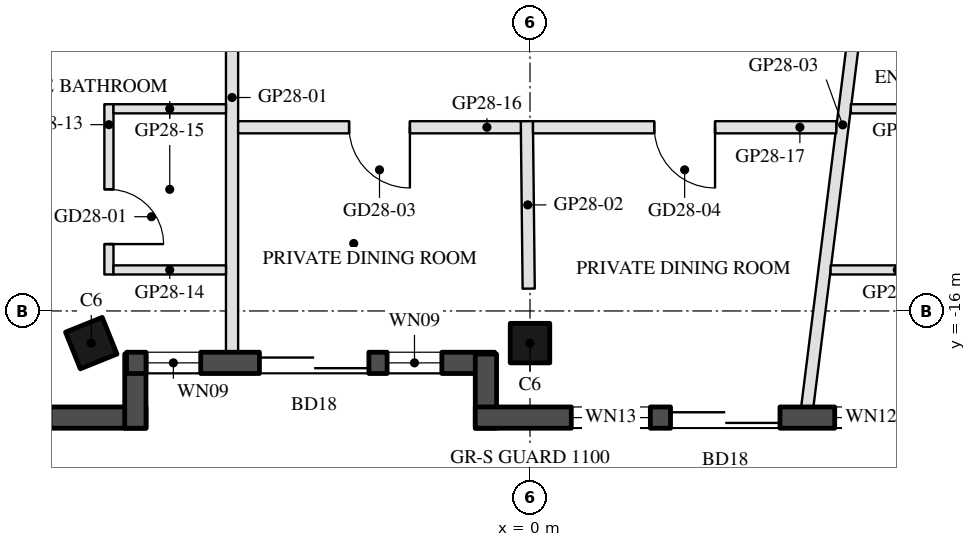
"""IFC4 building model, lengths in metres.
Left out: names, types, materials, properties, quantities, classifications, styles, units other than length and angle.
Written with IfcOpenShell. Run it as: python <this file> out.ifc"""

import sys

from ifc_helpers import new_model, si_unit, direction, frame, frame_2d, origin, origin_2d, place, context, subcontext, project, spatial, rectangle, hollow_rectangle, extrude, boolean, halfspace, element, fill, save


model = new_model("IFC4")
c1 = context("Model", 3, precision=1e-05, world=origin(), true_north=direction((0.0, 1.0)))
c2 = subcontext(c1, "Body", "Model", "MODEL_VIEW")
j1 = project(units=[si_unit("LENGTHUNIT", "METRE"), si_unit("PLANEANGLEUNIT", "RADIAN")], contexts=[c1])
p1 = place(None, origin())
s1 = spatial("IfcSite", under=j1, at=p1, CompositionType="ELEMENT")
p2 = place(p1, origin())
s2 = spatial("IfcBuilding", under=s1, at=p2, CompositionType="ELEMENT")
p3 = place(p2, frame((0.0, 0.0, 287.4)))
s3 = spatial("IfcBuildingStorey", under=s2, at=p3, CompositionType="ELEMENT", Elevation=287.4)
p4 = place(p3, frame((-7.215, -16.529, 0.0), z_axis=(0.060866554019, 0.151222465225, 0.986624056373), x_axis=(-0.998135530126, 0.004712991743, 0.06085434421)))
e1 = element("IfcColumn", 1, at=p4, inside=s3, PredefinedType="COLUMN", context=c2, shape_type="SweptSolid", body=[
    boolean("DIFFERENCE", boolean("DIFFERENCE", extrude(hollow_rectangle(XDim=0.65, YDim=0.65, WallThickness=0.03, at=origin_2d()), origin(), (0.0, 0.0, 1.0), 3.75), halfspace(frame((0.0, 0.0, 0.04), z_axis=(0.0, 0.0, 1.0), x_axis=(1.0, 0.0, 0.0)), True)), halfspace(frame((0.0, 0.0, 3.711), z_axis=(0.0, 0.0, 1.0), x_axis=(1.0, 0.0, 0.0)), False)),
])
p5 = place(p3, frame((0.0, -16.529, 0.0), z_axis=(0.0, 0.151503365725, 0.988456741681), x_axis=(-1.0, 0.0, 0.0)))
e2 = element("IfcColumn", 2, at=p5, inside=s3, PredefinedType="COLUMN", context=c2, shape_type="SweptSolid", body=[
    boolean("DIFFERENCE", boolean("DIFFERENCE", extrude(hollow_rectangle(XDim=0.65, YDim=0.65, WallThickness=0.03, at=origin_2d()), origin(), (0.0, 0.0, 1.0), 3.743), halfspace(frame((0.0, 0.0, 0.037), z_axis=(0.0, 0.0, 1.0), x_axis=(1.0, 0.0, 0.0)), True)), halfspace(frame((0.0, 0.0, 3.706), z_axis=(0.0, 0.0, 1.0), x_axis=(1.0, 0.0, 0.0)), False)),
])
p6 = place(p3, frame((-17.185, -17.754, 0.0), z_axis=(0.0, 0.0, 1.0), x_axis=(1.0, 0.0, 0.0)))
e3 = element("IfcWall", 3, at=p6, inside=s3, PredefinedType="SOLIDWALL", context=c2, shape_type="SweptSolid", body=[
    extrude(rectangle(XDim=10.87, YDim=0.35, at=frame_2d((5.435, 0.0))), origin(), (0.0, 0.0, 1.0), 3.55),
])
p7 = place(p6, frame((0.381, 0.0, 0.3)))
e4 = element("IfcOpeningElement", 4, at=p7, cuts=e3, PredefinedType="OPENING", context=c2, shape_type="SweptSolid", body=[
    extrude(rectangle(XDim=1.6, YDim=2.65, at=frame_2d((0.8, 1.325))), frame((0.0, 0.185, 0.0), z_axis=(0.0, -1.0, 0.0), x_axis=(1.0, 0.0, 0.0)), (0.0, 0.0, 1.0), 0.37),
])
p8 = place(p6, frame((6.89, 0.0, 0.0)))
e5 = element("IfcOpeningElement", 5, at=p8, cuts=e3, PredefinedType="OPENING", context=c2, shape_type="SweptSolid", body=[
    extrude(rectangle(XDim=2.4, YDim=2.4, at=frame_2d((1.2, 1.2))), frame((0.0, 0.185, 0.0), z_axis=(0.0, -1.0, 0.0), x_axis=(1.0, 0.0, 0.0)), (0.0, 0.0, 1.0), 0.37),
])
p9 = place(p6, frame((3.893, 0.0, 0.3)))
e6 = element("IfcOpeningElement", 6, at=p9, cuts=e3, PredefinedType="OPENING", context=c2, shape_type="SweptSolid", body=[
    extrude(rectangle(XDim=2.6, YDim=2.65, at=frame_2d((1.3, 1.325))), frame((0.0, 0.185, 0.0), z_axis=(0.0, -1.0, 0.0), x_axis=(1.0, 0.0, 0.0)), (0.0, 0.0, 1.0), 0.37),
])
p10 = place(p3, frame((-6.49, -17.929, 0.0), z_axis=(0.0, 0.0, 1.0), x_axis=(0.0, 1.0, 0.0)))
e7 = element("IfcWall", 7, at=p10, inside=s3, PredefinedType="SOLIDWALL", context=c2, shape_type="SweptSolid", body=[
    extrude(rectangle(XDim=1.22, YDim=0.35, at=frame_2d((0.61, 0.0))), origin(), (0.0, 0.0, 1.0), 3.55),
])
p11 = place(p3, frame((-6.635, -16.854, 0.0), z_axis=(0.0, 0.0, 1.0), x_axis=(1.0, 0.0, 0.0)))
e8 = element("IfcWall", 8, at=p11, inside=s3, PredefinedType="SOLIDWALL", context=c2, shape_type="SweptSolid", body=[
    extrude(rectangle(XDim=6.055, YDim=0.35, at=frame_2d((3.028, 0.0))), origin(), (0.0, 0.0, 1.0), 3.55),
])
p12 = place(p11, frame((0.32, 0.0, 0.3)))
e9 = element("IfcOpeningElement", 9, at=p12, cuts=e8, PredefinedType="OPENING", context=c2, shape_type="SweptSolid", body=[
    extrude(rectangle(XDim=0.9, YDim=2.65, at=frame_2d((0.45, 1.325))), frame((0.0, 0.185, 0.0), z_axis=(0.0, -1.0, 0.0), x_axis=(1.0, 0.0, 0.0)), (0.0, 0.0, 1.0), 0.37),
])
p13 = place(p11, frame((2.186, 0.0, 0.0)))
e10 = element("IfcOpeningElement", 10, at=p13, cuts=e8, PredefinedType="OPENING", context=c2, shape_type="SweptSolid", body=[
    extrude(rectangle(XDim=1.8, YDim=2.4, at=frame_2d((0.9, 1.2))), frame((0.0, 0.185, 0.0), z_axis=(0.0, -1.0, 0.0), x_axis=(1.0, 0.0, 0.0)), (0.0, 0.0, 1.0), 0.37),
])
p14 = place(p11, frame((4.285, 0.0, 0.3)))
e11 = element("IfcOpeningElement", 11, at=p14, cuts=e8, PredefinedType="OPENING", context=c2, shape_type="SweptSolid", body=[
    extrude(rectangle(XDim=0.9, YDim=2.65, at=frame_2d((0.45, 1.325))), frame((0.0, 0.185, 0.0), z_axis=(0.0, -1.0, 0.0), x_axis=(1.0, 0.0, 0.0)), (0.0, 0.0, 1.0), 0.37),
])
p15 = place(p3, frame((-0.725, -16.709, 0.0), z_axis=(0.0, 0.0, 1.0), x_axis=(0.0, -1.0, 0.0)))
e12 = element("IfcWall", 12, at=p15, inside=s3, PredefinedType="SOLIDWALL", context=c2, shape_type="SweptSolid", body=[
    extrude(rectangle(XDim=1.22, YDim=0.35, at=frame_2d((0.61, 0.0))), origin(), (0.0, 0.0, 1.0), 3.55),
])
p16 = place(p3, frame((-0.9, -17.754, 0.0), z_axis=(0.0, 0.0, 1.0), x_axis=(1.0, 0.0, 0.0)))
e13 = element("IfcWall", 13, at=p16, inside=s3, PredefinedType="SOLIDWALL", context=c2, shape_type="SweptSolid", body=[
    extrude(rectangle(XDim=9.015, YDim=0.35, at=frame_2d((4.508, 0.0))), origin(), (0.0, 0.0, 1.0), 3.55),
])
p17 = place(p16, frame((3.211, 0.0, 0.0)))
e14 = element("IfcOpeningElement", 14, at=p17, cuts=e13, PredefinedType="OPENING", context=c2, shape_type="SweptSolid", body=[
    extrude(rectangle(XDim=1.8, YDim=2.4, at=frame_2d((0.9, 1.2))), frame((0.0, 0.185, 0.0), z_axis=(0.0, -1.0, 0.0), x_axis=(1.0, 0.0, 0.0)), (0.0, 0.0, 1.0), 0.37),
])
p18 = place(p16, frame((1.579, 0.0, 0.3)))
e15 = element("IfcOpeningElement", 15, at=p18, cuts=e13, PredefinedType="OPENING", context=c2, shape_type="SweptSolid", body=[
    extrude(rectangle(XDim=1.3, YDim=2.65, at=frame_2d((0.65, 1.325))), frame((0.0, 0.185, 0.0), z_axis=(0.0, -1.0, 0.0), x_axis=(1.0, 0.0, 0.0)), (0.0, 0.0, 1.0), 0.37),
])
p19 = place(p16, frame((5.911, 0.0, 0.3)))
e16 = element("IfcOpeningElement", 16, at=p19, cuts=e13, PredefinedType="OPENING", context=c2, shape_type="SweptSolid", body=[
    extrude(rectangle(XDim=1.2, YDim=2.65, at=frame_2d((0.6, 1.325))), frame((0.0, 0.185, 0.0), z_axis=(0.0, -1.0, 0.0), x_axis=(1.0, 0.0, 0.0)), (0.0, 0.0, 1.0), 0.37),
])
p20 = place(p3, frame((-4.9, -16.679, 0.0), z_axis=(0.0, 0.0, 1.0), x_axis=(0.0, 1.0, 0.0)))
e17 = element("IfcWall", 17, at=p20, inside=s3, PredefinedType="PARTITIONING", context=c2, shape_type="SweptSolid", body=[
    extrude(rectangle(XDim=8.379, YDim=0.2, at=frame_2d((4.189, 0.0))), origin(), (0.0, 0.0, 1.0), 3.1),
])
p21 = place(p3, frame((-0.021, -15.633, 0.0), z_axis=(0.0, 0.0, 1.0), x_axis=(-0.010991269362, 0.999939594174, 0.0)))
e18 = element("IfcWall", 18, at=p21, inside=s3, PredefinedType="PARTITIONING", context=c2, shape_type="SweptSolid", body=[
    extrude(rectangle(XDim=2.754, YDim=0.2, at=frame_2d((1.377, 0.0))), origin(), (0.0, 0.0, 1.0), 3.05),
])
p22 = place(p3, frame((4.56, -17.579, 0.0), z_axis=(0.0, 0.0, 1.0), x_axis=(0.124584174438, 0.992209042228, 0.0)))
e19 = element("IfcWall", 19, at=p22, inside=s3, PredefinedType="PARTITIONING", context=c2, shape_type="SweptSolid", body=[
    extrude(rectangle(XDim=9.351, YDim=0.2, at=frame_2d((4.676, 0.0))), origin(), (0.0, 0.0, 1.0), 3.1),
])
p23 = place(p3, frame((-6.925, -12.6, 0.0), z_axis=(0.0, 0.0, 1.0), x_axis=(0.0, -1.0, 0.0)))
e20 = element("IfcWall", 20, at=p23, inside=s3, PredefinedType="PARTITIONING", context=c2, shape_type="SweptSolid", body=[
    extrude(rectangle(XDim=2.8, YDim=0.15, at=frame_2d((1.4, 0.0))), origin(), (0.0, 0.0, 1.0), 3.05),
])
p24 = place(p23, frame((1.4, 0.0, 0.0)))
e21 = element("IfcOpeningElement", 21, at=p24, cuts=e20, PredefinedType="OPENING", context=c2, shape_type="SweptSolid", body=[
    extrude(rectangle(XDim=0.9, YDim=2.1, at=frame_2d((0.45, 1.05))), frame((0.0, 0.085, 0.0), z_axis=(0.0, -1.0, 0.0), x_axis=(1.0, 0.0, 0.0)), (0.0, 0.0, 1.0), 0.17),
])
p25 = place(p3, frame((-6.85, -15.325, 0.0), z_axis=(0.0, 0.0, 1.0), x_axis=(1.0, 0.0, 0.0)))
e22 = element("IfcWall", 22, at=p25, inside=s3, PredefinedType="PARTITIONING", context=c2, shape_type="SweptSolid", body=[
    extrude(rectangle(XDim=1.85, YDim=0.15, at=frame_2d((0.925, 0.0))), origin(), (0.0, 0.0, 1.0), 3.1),
])
p26 = place(p3, frame((-6.85, -12.675, 0.0), z_axis=(0.0, 0.0, 1.0), x_axis=(1.0, 0.0, 0.0)))
e23 = element("IfcWall", 23, at=p26, inside=s3, PredefinedType="PARTITIONING", context=c2, shape_type="SweptSolid", body=[
    extrude(rectangle(XDim=1.85, YDim=0.15, at=frame_2d((0.925, 0.0))), origin(), (0.0, 0.0, 1.0), 3.55),
])
p27 = place(p3, frame((-0.151, -12.979, 0.0), z_axis=(0.0, 0.0, 1.0), x_axis=(-1.0, 0.0, 0.0)))
e24 = element("IfcWall", 24, at=p27, inside=s3, PredefinedType="PARTITIONING", context=c2, shape_type="SweptSolid", body=[
    extrude(rectangle(XDim=4.649, YDim=0.2, at=frame_2d((2.325, 0.0))), origin(), (0.0, 0.0, 1.0), 3.05),
])
p28 = place(p27, frame((1.825, 0.0, 0.0)))
e25 = element("IfcOpeningElement", 25, at=p28, cuts=e24, PredefinedType="OPENING", context=c2, shape_type="SweptSolid", body=[
    extrude(rectangle(XDim=1.0, YDim=2.1, at=frame_2d((0.5, 1.05))), frame((0.0, 0.11, 0.0), z_axis=(0.0, -1.0, 0.0), x_axis=(1.0, 0.0, 0.0)), (0.0, 0.0, 1.0), 0.22),
])
p29 = place(p3, frame((5.037, -12.979, 0.0), z_axis=(0.0, 0.0, 1.0), x_axis=(-1.0, 0.0, 0.0)))
e26 = element("IfcWall", 26, at=p29, inside=s3, PredefinedType="PARTITIONING", context=c2, shape_type="SweptSolid", body=[
    extrude(rectangle(XDim=4.988, YDim=0.2, at=frame_2d((2.494, 0.0))), origin(), (0.0, 0.0, 1.0), 3.05),
])
p30 = place(p29, frame((1.994, 0.0, 0.0)))
e27 = element("IfcOpeningElement", 27, at=p30, cuts=e26, PredefinedType="OPENING", context=c2, shape_type="SweptSolid", body=[
    extrude(rectangle(XDim=1.0, YDim=2.1, at=frame_2d((0.5, 1.05))), frame((0.0, 0.11, 0.0), z_axis=(0.0, -1.0, 0.0), x_axis=(1.0, 0.0, 0.0)), (0.0, 0.0, 1.0), 0.22),
])
p31 = place(p3, frame((4.944, -15.325, 0.0), z_axis=(0.0, 0.0, 1.0), x_axis=(1.0, 0.0, 0.0)))
e28 = element("IfcWall", 28, at=p31, inside=s3, PredefinedType="PARTITIONING", context=c2, shape_type="SweptSolid", body=[
    extrude(rectangle(XDim=2.192, YDim=0.15, at=frame_2d((1.096, 0.0))), origin(), (0.0, 0.0, 1.0), 3.05),
])
p32 = place(p3, frame((5.277, -12.675, 0.0), z_axis=(0.0, 0.0, 1.0), x_axis=(1.0, 0.0, 0.0)))
e29 = element("IfcWall", 29, at=p32, inside=s3, PredefinedType="PARTITIONING", context=c2, shape_type="SweptSolid", body=[
    extrude(rectangle(XDim=1.859, YDim=0.15, at=frame_2d((0.93, 0.0))), origin(), (0.0, 0.0, 1.0), 3.05),
])
p33 = place(p12, origin())
e30 = element("IfcWindow", 30, at=p33, inside=s3, PartitioningType="SINGLE_PANEL", PredefinedType="WINDOW", context=c2, shape_type="SweptSolid", body=[
    extrude(rectangle(XDim=0.9, YDim=2.65, at=frame_2d((0.45, 1.325))), frame((0.0, 0.03, 0.0), z_axis=(0.0, -1.0, 0.0), x_axis=(1.0, 0.0, 0.0)), (0.0, 0.0, 1.0), 0.06),
])
fill(e9, e30)
p34 = place(p13, frame((1.8, 0.0, 0.0), z_axis=(0.0, 0.0, 1.0), x_axis=(-1.0, 0.0, 0.0)))
e31 = element("IfcDoor", 31, at=p34, inside=s3, OperationType="SLIDING_TO_LEFT", PredefinedType="DOOR", context=c2, shape_type="SweptSolid", body=[
    extrude(rectangle(XDim=1.8, YDim=2.4, at=frame_2d((0.9, 1.2))), frame((0.0, 0.025, 0.0), z_axis=(0.0, -1.0, 0.0), x_axis=(1.0, 0.0, 0.0)), (0.0, 0.0, 1.0), 0.05),
])
fill(e10, e31)
p35 = place(p14, origin())
e32 = element("IfcWindow", 32, at=p35, inside=s3, PartitioningType="SINGLE_PANEL", PredefinedType="WINDOW", context=c2, shape_type="SweptSolid", body=[
    extrude(rectangle(XDim=0.9, YDim=2.65, at=frame_2d((0.45, 1.325))), frame((0.0, 0.03, 0.0), z_axis=(0.0, -1.0, 0.0), x_axis=(1.0, 0.0, 0.0)), (0.0, 0.0, 1.0), 0.06),
])
fill(e11, e32)
p36 = place(p17, frame((1.8, 0.0, 0.0), z_axis=(0.0, 0.0, 1.0), x_axis=(-1.0, 0.0, 0.0)))
e33 = element("IfcDoor", 33, at=p36, inside=s3, OperationType="SLIDING_TO_LEFT", PredefinedType="DOOR", context=c2, shape_type="SweptSolid", body=[
    extrude(rectangle(XDim=1.8, YDim=2.4, at=frame_2d((0.9, 1.2))), frame((0.0, 0.025, 0.0), z_axis=(0.0, -1.0, 0.0), x_axis=(1.0, 0.0, 0.0)), (0.0, 0.0, 1.0), 0.05),
])
fill(e14, e33)
p37 = place(p18, origin())
e34 = element("IfcWindow", 34, at=p37, inside=s3, PartitioningType="SINGLE_PANEL", PredefinedType="WINDOW", context=c2, shape_type="SweptSolid", body=[
    extrude(rectangle(XDim=1.3, YDim=2.65, at=frame_2d((0.65, 1.325))), frame((0.0, 0.03, 0.0), z_axis=(0.0, -1.0, 0.0), x_axis=(1.0, 0.0, 0.0)), (0.0, 0.0, 1.0), 0.06),
])
fill(e15, e34)
p38 = place(p19, origin())
e35 = element("IfcWindow", 35, at=p38, inside=s3, PartitioningType="SINGLE_PANEL", PredefinedType="WINDOW", context=c2, shape_type="SweptSolid", body=[
    extrude(rectangle(XDim=1.2, YDim=2.65, at=frame_2d((0.6, 1.325))), frame((0.0, 0.03, 0.0), z_axis=(0.0, -1.0, 0.0), x_axis=(1.0, 0.0, 0.0)), (0.0, 0.0, 1.0), 0.06),
])
fill(e16, e35)
p39 = place(p24, origin())
e36 = element("IfcDoor", 36, at=p39, inside=s3, OperationType="SINGLE_SWING_RIGHT", PredefinedType="DOOR", context=c2, shape_type="SweptSolid", body=[
    extrude(rectangle(XDim=0.9, YDim=2.1, at=frame_2d((0.45, 1.05))), frame((0.0, 0.025, 0.0), z_axis=(0.0, -1.0, 0.0), x_axis=(1.0, 0.0, 0.0)), (0.0, 0.0, 1.0), 0.05),
])
fill(e21, e36)
p40 = place(p28, origin())
e37 = element("IfcDoor", 37, at=p40, inside=s3, OperationType="SINGLE_SWING_LEFT", PredefinedType="DOOR", context=c2, shape_type="SweptSolid", body=[
    extrude(rectangle(XDim=1.0, YDim=2.1, at=frame_2d((0.5, 1.05))), frame((0.0, 0.025, 0.0), z_axis=(0.0, -1.0, 0.0), x_axis=(1.0, 0.0, 0.0)), (0.0, 0.0, 1.0), 0.05),
])
fill(e25, e37)
p41 = place(p30, origin())
e38 = element("IfcDoor", 38, at=p41, inside=s3, OperationType="SINGLE_SWING_LEFT", PredefinedType="DOOR", context=c2, shape_type="SweptSolid", body=[
    extrude(rectangle(XDim=1.0, YDim=2.1, at=frame_2d((0.5, 1.05))), frame((0.0, 0.025, 0.0), z_axis=(0.0, -1.0, 0.0), x_axis=(1.0, 0.0, 0.0)), (0.0, 0.0, 1.0), 0.05),
])
fill(e27, e38)
save(model, sys.argv[1])
